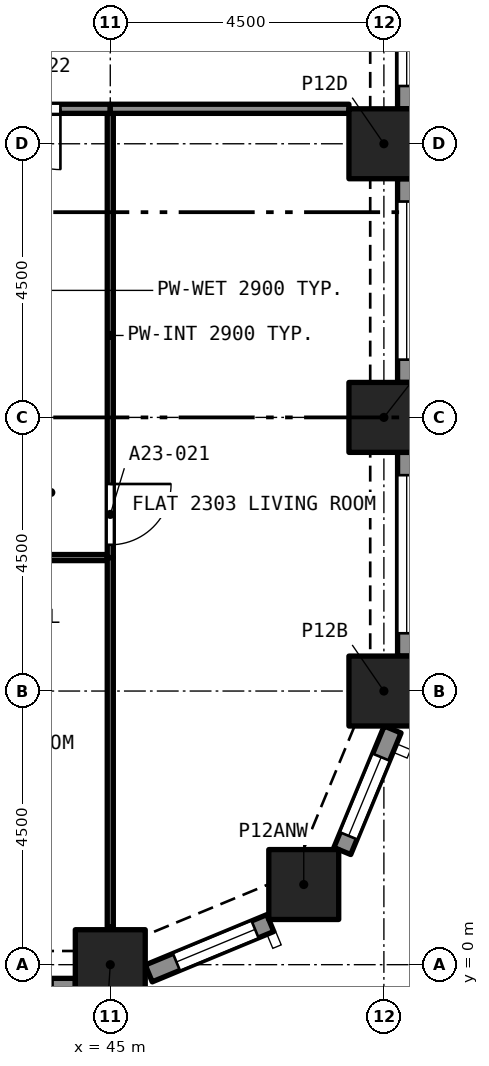
"""IFC4 building model, lengths in metres.
Left out: names, types, materials, properties, quantities, classifications, styles, units other than length and angle.
Written with IfcOpenShell. Run it as: python <this file> out.ifc"""

import sys

from ifc_helpers import new_model, si_unit, direction, frame, frame_2d, origin, origin_2d, place, context, subcontext, project, spatial, rectangle, extrude, element, fill, save


model = new_model("IFC4")
c1 = context("Model", 3, precision=1e-05, world=origin(), true_north=direction((0.0, 1.0)))
c2 = subcontext(c1, "Body", "Model", "MODEL_VIEW")
j1 = project(units=[si_unit("LENGTHUNIT", "METRE"), si_unit("PLANEANGLEUNIT", "RADIAN")], contexts=[c1])
p1 = place(None, origin())
s1 = spatial("IfcSite", under=j1, at=p1, CompositionType="ELEMENT")
p2 = place(p1, origin())
s2 = spatial("IfcBuilding", under=s1, at=p2, CompositionType="ELEMENT")
p3 = place(p2, frame((0.0, 0.0, 86.4)))
s3 = spatial("IfcBuildingStorey", under=s2, at=p3, CompositionType="ELEMENT", Elevation=86.4)
for number, where, z_axis, x_axis in (
    (1, (45.0, 0.0, 0.0), (0.0, 0.0, 1.0), (1.0, 0.0, 0.0)),
    (2, (48.182, 1.318, 0.0), (0.0, 0.0, 1.0), (1.0, 0.0, 0.0)),
    (3, (49.5, 4.5, 0.0), (0.0, 0.0, 1.0), (1.0, 0.0, 0.0)),
    (4, (49.5, 9.0, 0.0), (0.0, 0.0, 1.0), (1.0, 0.0, 0.0)),
    (5, (49.5, 13.5, 0.0), (0.0, 0.0, 1.0), (1.0, 0.0, 0.0)),
):
    element("IfcColumn", number, at=place(p3, frame(where, z_axis=z_axis, x_axis=x_axis)), inside=s3, PredefinedType="COLUMN", context=c2, shape_type="SweptSolid", body=[
        extrude(rectangle(XDim=1.15, YDim=1.15, at=origin_2d()), origin(), (0.0, 0.0, 1.0), 3.2),
    ])
p4 = place(p3, frame((44.425, -0.375, 0.0), z_axis=(0.0, 0.0, 1.0), x_axis=(-1.0, 0.0, 0.0)))
e6 = element("IfcWall", 6, at=p4, inside=s3, PredefinedType="SOLIDWALL", context=c2, shape_type="SweptSolid", body=[
    extrude(rectangle(XDim=3.35, YDim=0.3, at=frame_2d((1.675, 0.0))), origin(), (0.0, 0.0, 1.0), 3.2),
])
p5 = place(p4, frame((0.375, 0.0, 0.45)))
e7 = element("IfcOpeningElement", 7, at=p5, cuts=e6, PredefinedType="OPENING", context=c2, shape_type="SweptSolid", body=[
    extrude(rectangle(XDim=2.6, YDim=1.95, at=frame_2d((1.3, 0.975))), frame((0.0, 0.16, 0.0), z_axis=(0.0, -1.0, 0.0), x_axis=(1.0, 0.0, 0.0)), (0.0, 0.0, 1.0), 0.32),
])
p6 = place(p3, frame((47.631, 0.684, 0.0), z_axis=(0.0, 0.0, 1.0), x_axis=(-0.923862802911, -0.382723818695, 0.0)))
e8 = element("IfcWall", 8, at=p6, inside=s3, PredefinedType="SOLIDWALL", context=c2, shape_type="SweptSolid", body=[
    extrude(rectangle(XDim=2.164, YDim=0.3, at=frame_2d((1.082, 0.0))), origin(), (0.0, 0.0, 1.0), 3.2),
])
p7 = place(p6, frame((0.271, 0.0, 0.45)))
e9 = element("IfcOpeningElement", 9, at=p7, cuts=e8, PredefinedType="OPENING", context=c2, shape_type="SweptSolid", body=[
    extrude(rectangle(XDim=1.4, YDim=1.95, at=frame_2d((0.7, 0.975))), frame((0.0, 0.16, 0.0), z_axis=(0.0, -1.0, 0.0), x_axis=(1.0, 0.0, 0.0)), (0.0, 0.0, 1.0), 0.32),
])
p8 = place(p3, frame((49.644, 3.868, 0.0), z_axis=(0.0, 0.0, 1.0), x_axis=(-0.382723818695, -0.923862802911, 0.0)))
e10 = element("IfcWall", 10, at=p8, inside=s3, PredefinedType="SOLIDWALL", context=c2, shape_type="SweptSolid", body=[
    extrude(rectangle(XDim=2.164, YDim=0.3, at=frame_2d((1.082, 0.0))), origin(), (0.0, 0.0, 1.0), 3.2),
])
p9 = place(p8, frame((0.493, 0.0, 0.45)))
e11 = element("IfcOpeningElement", 11, at=p9, cuts=e10, PredefinedType="OPENING", context=c2, shape_type="SweptSolid", body=[
    extrude(rectangle(XDim=1.4, YDim=1.95, at=frame_2d((0.7, 0.975))), frame((0.0, 0.16, 0.0), z_axis=(0.0, -1.0, 0.0), x_axis=(1.0, 0.0, 0.0)), (0.0, 0.0, 1.0), 0.32),
])
p10 = place(p3, frame((49.875, 8.425, 0.0), z_axis=(0.0, 0.0, 1.0), x_axis=(0.0, -1.0, 0.0)))
e12 = element("IfcWall", 12, at=p10, inside=s3, PredefinedType="SOLIDWALL", context=c2, shape_type="SweptSolid", body=[
    extrude(rectangle(XDim=3.35, YDim=0.3, at=frame_2d((1.675, 0.0))), origin(), (0.0, 0.0, 1.0), 3.2),
])
p11 = place(p10, frame((0.375, 0.0, 0.45)))
e13 = element("IfcOpeningElement", 13, at=p11, cuts=e12, PredefinedType="OPENING", context=c2, shape_type="SweptSolid", body=[
    extrude(rectangle(XDim=2.6, YDim=1.95, at=frame_2d((1.3, 0.975))), frame((0.0, 0.16, 0.0), z_axis=(0.0, -1.0, 0.0), x_axis=(1.0, 0.0, 0.0)), (0.0, 0.0, 1.0), 0.32),
])
p12 = place(p3, frame((49.875, 12.925, 0.0), z_axis=(0.0, 0.0, 1.0), x_axis=(0.0, -1.0, 0.0)))
e14 = element("IfcWall", 14, at=p12, inside=s3, PredefinedType="SOLIDWALL", context=c2, shape_type="SweptSolid", body=[
    extrude(rectangle(XDim=3.35, YDim=0.3, at=frame_2d((1.675, 0.0))), origin(), (0.0, 0.0, 1.0), 3.2),
])
p13 = place(p12, frame((0.375, 0.0, 0.45)))
e15 = element("IfcOpeningElement", 15, at=p13, cuts=e14, PredefinedType="OPENING", context=c2, shape_type="SweptSolid", body=[
    extrude(rectangle(XDim=2.6, YDim=1.95, at=frame_2d((1.3, 0.975))), frame((0.0, 0.16, 0.0), z_axis=(0.0, -1.0, 0.0), x_axis=(1.0, 0.0, 0.0)), (0.0, 0.0, 1.0), 0.32),
])
p14 = place(p3, frame((49.875, 17.425, 0.0), z_axis=(0.0, 0.0, 1.0), x_axis=(0.0, -1.0, 0.0)))
e16 = element("IfcWall", 16, at=p14, inside=s3, PredefinedType="SOLIDWALL", context=c2, shape_type="SweptSolid", body=[
    extrude(rectangle(XDim=3.35, YDim=0.3, at=frame_2d((1.675, 0.0))), origin(), (0.0, 0.0, 1.0), 3.2),
])
p15 = place(p14, frame((0.375, 0.0, 0.45)))
e17 = element("IfcOpeningElement", 17, at=p15, cuts=e16, PredefinedType="OPENING", context=c2, shape_type="SweptSolid", body=[
    extrude(rectangle(XDim=2.6, YDim=1.95, at=frame_2d((1.3, 0.975))), frame((0.0, 0.16, 0.0), z_axis=(0.0, -1.0, 0.0), x_axis=(1.0, 0.0, 0.0)), (0.0, 0.0, 1.0), 0.32),
])
p16 = place(p3, frame((44.95, 6.695, 0.0), z_axis=(0.0, 0.0, 1.0), x_axis=(-1.0, 0.0, 0.0)))
e18 = element("IfcWall", 18, at=p16, inside=s3, PredefinedType="PARTITIONING", context=c2, shape_type="SweptSolid", body=[
    extrude(rectangle(XDim=4.35, YDim=0.1, at=frame_2d((2.175, 0.0))), origin(), (0.0, 0.0, 1.0), 2.9),
])
p17 = place(p16, frame((1.75, 0.0, 0.0)))
e19 = element("IfcOpeningElement", 19, at=p17, cuts=e18, PredefinedType="OPENING", context=c2, shape_type="SweptSolid", body=[
    extrude(rectangle(XDim=0.9, YDim=2.1, at=frame_2d((0.45, 1.05))), frame((0.0, 0.06, 0.0), z_axis=(0.0, -1.0, 0.0), x_axis=(1.0, 0.0, 0.0)), (0.0, 0.0, 1.0), 0.12),
])
p18 = place(p3, frame((45.0, 0.622, 0.0), z_axis=(0.0, 0.0, 1.0), x_axis=(0.0, 1.0, 0.0)))
e20 = element("IfcWall", 20, at=p18, inside=s3, PredefinedType="PARTITIONING", context=c2, shape_type="SweptSolid", body=[
    extrude(rectangle(XDim=6.073, YDim=0.1, at=frame_2d((3.036, 0.0))), origin(), (0.0, 0.0, 1.0), 2.9),
])
p19 = place(p3, frame((45.0, 14.0, 0.0), z_axis=(0.0, 0.0, 1.0), x_axis=(0.0, -1.0, 0.0)))
e21 = element("IfcWall", 21, at=p19, inside=s3, PredefinedType="PARTITIONING", context=c2, shape_type="SweptSolid", body=[
    extrude(rectangle(XDim=7.305, YDim=0.1, at=frame_2d((3.652, 0.0))), origin(), (0.0, 0.0, 1.0), 2.9),
])
p20 = place(p19, frame((6.095, 0.0, 0.0)))
e22 = element("IfcOpeningElement", 22, at=p20, cuts=e21, PredefinedType="OPENING", context=c2, shape_type="SweptSolid", body=[
    extrude(rectangle(XDim=1.0, YDim=2.1, at=frame_2d((0.5, 1.05))), frame((0.0, 0.06, 0.0), z_axis=(0.0, -1.0, 0.0), x_axis=(1.0, 0.0, 0.0)), (0.0, 0.0, 1.0), 0.12),
])
p21 = place(p3, frame((45.0, 14.075, 0.0), z_axis=(0.0, 0.0, 1.0), x_axis=(-1.0, 0.0, 0.0)))
e23 = element("IfcWall", 23, at=p21, inside=s3, PredefinedType="PARTITIONING", context=c2, shape_type="SweptSolid", body=[
    extrude(rectangle(XDim=1.95, YDim=0.15, at=frame_2d((0.975, 0.0))), origin(), (0.0, 0.0, 1.0), 2.9),
])
p22 = place(p21, frame((0.82, 0.0, 0.0)))
e24 = element("IfcOpeningElement", 24, at=p22, cuts=e23, PredefinedType="OPENING", context=c2, shape_type="SweptSolid", body=[
    extrude(rectangle(XDim=1.0, YDim=2.1, at=frame_2d((0.5, 1.05))), frame((0.0, 0.085, 0.0), z_axis=(0.0, -1.0, 0.0), x_axis=(1.0, 0.0, 0.0)), (0.0, 0.0, 1.0), 0.17),
])
p23 = place(p3, frame((45.0, 14.075, 0.0), z_axis=(0.0, 0.0, 1.0), x_axis=(1.0, 0.0, 0.0)))
e25 = element("IfcWall", 25, at=p23, inside=s3, PredefinedType="PARTITIONING", context=c2, shape_type="SweptSolid", body=[
    extrude(rectangle(XDim=3.925, YDim=0.15, at=frame_2d((1.962, 0.0))), origin(), (0.0, 0.0, 1.0), 2.9),
])
p24 = place(p7, origin())
e26 = element("IfcWindow", 26, at=p24, inside=s3, PartitioningType="SINGLE_PANEL", PredefinedType="WINDOW", context=c2, shape_type="SweptSolid", body=[
    extrude(rectangle(XDim=1.4, YDim=1.95, at=frame_2d((0.7, 0.975))), frame((0.0, 0.03, 0.0), z_axis=(0.0, -1.0, 0.0), x_axis=(1.0, 0.0, 0.0)), (0.0, 0.0, 1.0), 0.06),
])
fill(e9, e26)
p25 = place(p9, origin())
e27 = element("IfcWindow", 27, at=p25, inside=s3, PartitioningType="SINGLE_PANEL", PredefinedType="WINDOW", context=c2, shape_type="SweptSolid", body=[
    extrude(rectangle(XDim=1.4, YDim=1.95, at=frame_2d((0.7, 0.975))), frame((0.0, 0.03, 0.0), z_axis=(0.0, -1.0, 0.0), x_axis=(1.0, 0.0, 0.0)), (0.0, 0.0, 1.0), 0.06),
])
fill(e11, e27)
p26 = place(p11, origin())
e28 = element("IfcWindow", 28, at=p26, inside=s3, PartitioningType="SINGLE_PANEL", PredefinedType="WINDOW", context=c2, shape_type="SweptSolid", body=[
    extrude(rectangle(XDim=2.6, YDim=1.95, at=frame_2d((1.3, 0.975))), frame((0.0, 0.03, 0.0), z_axis=(0.0, -1.0, 0.0), x_axis=(1.0, 0.0, 0.0)), (0.0, 0.0, 1.0), 0.06),
])
fill(e13, e28)
p27 = place(p13, origin())
e29 = element("IfcWindow", 29, at=p27, inside=s3, PartitioningType="SINGLE_PANEL", PredefinedType="WINDOW", context=c2, shape_type="SweptSolid", body=[
    extrude(rectangle(XDim=2.6, YDim=1.95, at=frame_2d((1.3, 0.975))), frame((0.0, 0.03, 0.0), z_axis=(0.0, -1.0, 0.0), x_axis=(1.0, 0.0, 0.0)), (0.0, 0.0, 1.0), 0.06),
])
fill(e15, e29)
p28 = place(p15, origin())
e30 = element("IfcWindow", 30, at=p28, inside=s3, PartitioningType="SINGLE_PANEL", PredefinedType="WINDOW", context=c2, shape_type="SweptSolid", body=[
    extrude(rectangle(XDim=2.6, YDim=1.95, at=frame_2d((1.3, 0.975))), frame((0.0, 0.03, 0.0), z_axis=(0.0, -1.0, 0.0), x_axis=(1.0, 0.0, 0.0)), (0.0, 0.0, 1.0), 0.06),
])
fill(e17, e30)
p29 = place(p20, origin())
e31 = element("IfcDoor", 31, at=p29, inside=s3, OperationType="SINGLE_SWING_RIGHT", PredefinedType="DOOR", context=c2, shape_type="SweptSolid", body=[
    extrude(rectangle(XDim=1.0, YDim=2.1, at=frame_2d((0.5, 1.05))), frame((0.0, 0.025, 0.0), z_axis=(0.0, -1.0, 0.0), x_axis=(1.0, 0.0, 0.0)), (0.0, 0.0, 1.0), 0.05),
])
fill(e22, e31)
p30 = place(p22, origin())
e32 = element("IfcDoor", 32, at=p30, inside=s3, OperationType="SINGLE_SWING_RIGHT", PredefinedType="DOOR", context=c2, shape_type="SweptSolid", body=[
    extrude(rectangle(XDim=1.0, YDim=2.1, at=frame_2d((0.5, 1.05))), frame((0.0, 0.025, 0.0), z_axis=(0.0, -1.0, 0.0), x_axis=(1.0, 0.0, 0.0)), (0.0, 0.0, 1.0), 0.05),
])
fill(e24, e32)
save(model, sys.argv[1])
